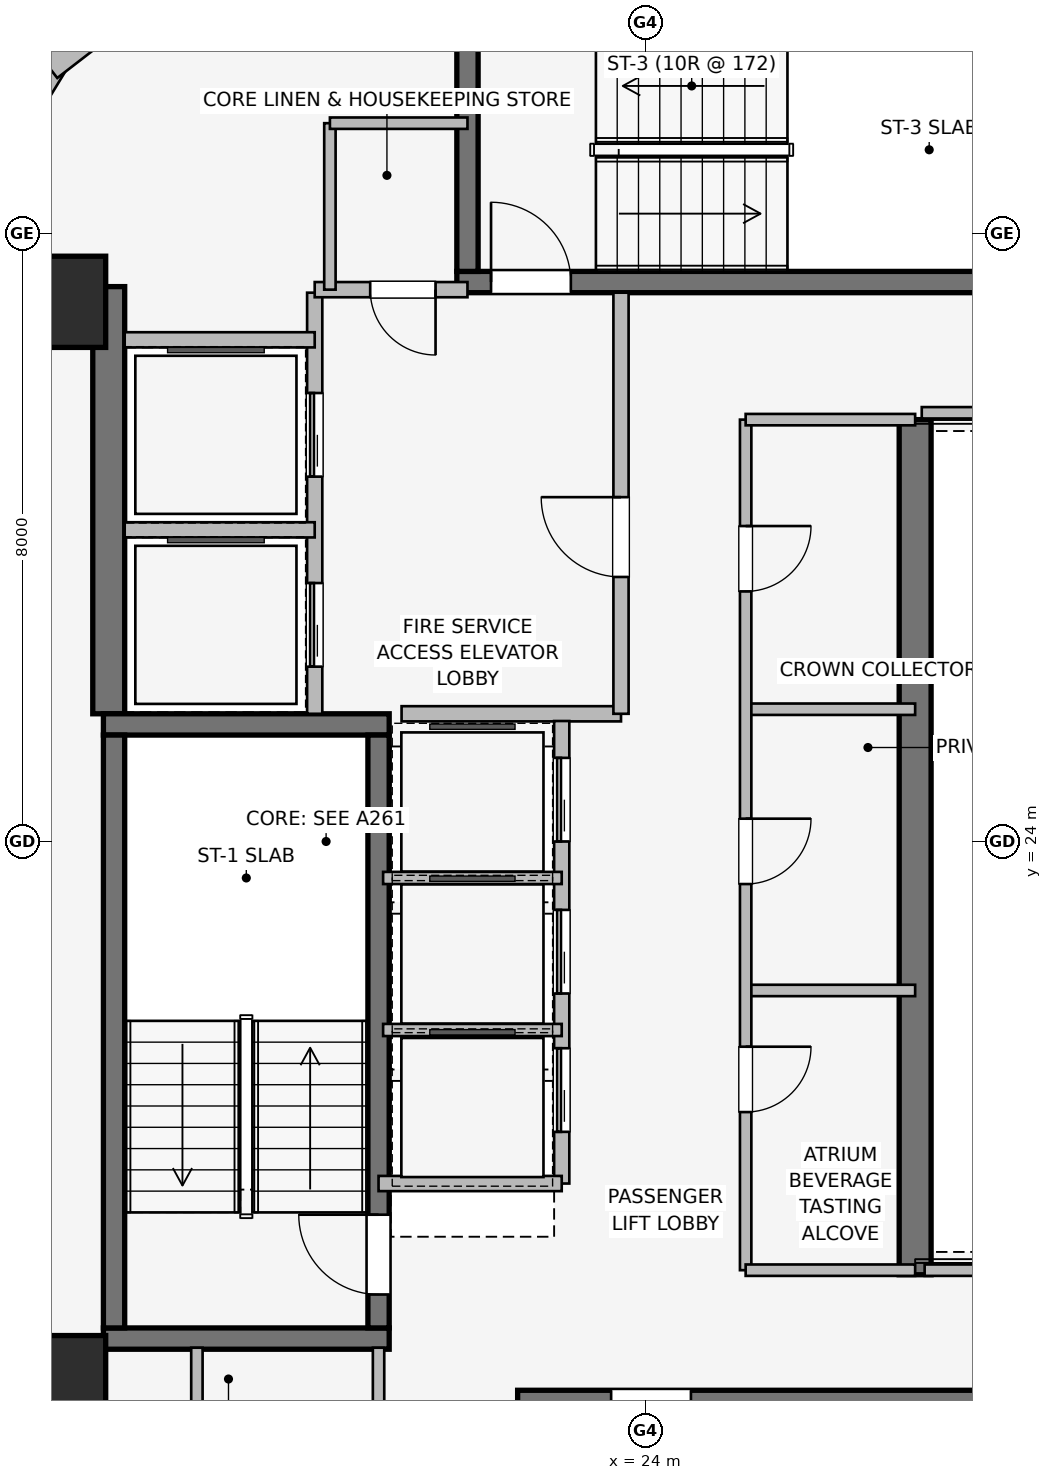
"""IFC4 building model, lengths in metres.
Left out: names, types, materials, properties, quantities, classifications, styles, units other than length and angle.
Written with IfcOpenShell. Run it as: python <this file> out.ifc"""

import sys

from ifc_helpers import new_model, si_unit, direction, frame, frame_2d, origin, origin_2d, place, context, subcontext, project, spatial, rectangle, extrude, element, fill, save


model = new_model("IFC4")
c1 = context("Model", 3, precision=1e-05, world=origin(), true_north=direction((0.0, 1.0)))
c2 = subcontext(c1, "Body", "Model", "MODEL_VIEW")
j1 = project(units=[si_unit("LENGTHUNIT", "METRE"), si_unit("PLANEANGLEUNIT", "RADIAN")], contexts=[c1])
p1 = place(None, origin())
s1 = spatial("IfcSite", under=j1, at=p1, CompositionType="ELEMENT")
p2 = place(p1, origin())
s2 = spatial("IfcBuilding", under=s1, at=p2, CompositionType="ELEMENT")
p3 = place(p2, frame((0.0, 0.0, 217.15)))
s3 = spatial("IfcBuildingStorey", under=s2, at=p3, CompositionType="ELEMENT", Elevation=217.15)
p4 = place(p3, frame((16.94, 25.68, 0.0), z_axis=(0.0, 0.0, 1.0), x_axis=(0.0, 1.0, 0.0)))
e1 = element("IfcWall", 1, at=p4, inside=s3, PredefinedType="SHEAR", context=c2, shape_type="SweptSolid", body=[
    extrude(rectangle(XDim=5.62, YDim=0.42, at=frame_2d((2.81, 0.0))), origin(), (0.0, 0.0, 1.0), 3.45),
])
p5 = place(p3, frame((27.55, 29.55, 0.0), z_axis=(0.0, 0.0, 1.0), x_axis=(0.0, -1.0, 0.0)))
e2 = element("IfcWall", 2, at=p5, inside=s3, PredefinedType="SHEAR", context=c2, shape_type="SweptSolid", body=[
    extrude(rectangle(XDim=11.25, YDim=0.42, at=frame_2d((5.625, 0.0))), origin(), (0.0, 0.0, 1.0), 3.45),
])
for number, where, z_axis, x_axis in (
    (3, (16.87, 17.46, 0.0), (0.0, 0.0, 1.0), (1.0, 0.0, 0.0)),
    (4, (20.63, 25.54, 0.0), (0.0, 0.0, 1.0), (-1.0, 0.0, 0.0)),
):
    element("IfcWall", number, at=place(p3, frame(where, z_axis=z_axis, x_axis=x_axis)), inside=s3, PredefinedType="SHEAR", context=c2, shape_type="SweptSolid", body=[
        extrude(rectangle(XDim=3.76, YDim=0.28, at=frame_2d((1.88, 0.0))), origin(), (0.0, 0.0, 1.0), 3.45),
    ])
p6 = place(p3, frame((17.01, 25.4, 0.0), z_axis=(0.0, 0.0, 1.0), x_axis=(0.0, -1.0, 0.0)))
e5 = element("IfcWall", 5, at=p6, inside=s3, PredefinedType="SHEAR", context=c2, shape_type="SweptSolid", body=[
    extrude(rectangle(XDim=7.8, YDim=0.28, at=frame_2d((3.9, 0.0))), origin(), (0.0, 0.0, 1.0), 3.45),
])
p7 = place(p3, frame((20.49, 17.6, 0.0), z_axis=(0.0, 0.0, 1.0), x_axis=(0.0, 1.0, 0.0)))
e6 = element("IfcWall", 6, at=p7, inside=s3, PredefinedType="SHEAR", context=c2, shape_type="SweptSolid", body=[
    extrude(rectangle(XDim=7.8, YDim=0.28, at=frame_2d((3.9, 0.0))), origin(), (0.0, 0.0, 1.0), 3.45),
])
p8 = place(p7, frame((0.44, 0.0, 0.0)))
e7 = element("IfcOpeningElement", 7, at=p8, cuts=e6, PredefinedType="OPENING", context=c2, shape_type="SweptSolid", body=[
    extrude(rectangle(XDim=1.05, YDim=2.0, at=frame_2d((0.525, 1.0))), frame((0.0, 0.15, 0.0), z_axis=(0.0, -1.0, 0.0), x_axis=(1.0, 0.0, 0.0)), (0.0, 0.0, 1.0), 0.3),
])
p9 = place(p3, frame((30.68, 16.64, 0.0), z_axis=(0.0, 0.0, 1.0), x_axis=(-1.0, 0.0, 0.0)))
e8 = element("IfcWall", 8, at=p9, inside=s3, PredefinedType="SHEAR", context=c2, shape_type="SweptSolid", body=[
    extrude(rectangle(XDim=8.36, YDim=0.28, at=frame_2d((4.18, 0.0))), origin(), (0.0, 0.0, 1.0), 3.45),
])
p10 = place(p9, frame((6.08, 0.0, 0.0)))
e9 = element("IfcOpeningElement", 9, at=p10, cuts=e8, PredefinedType="OPENING", context=c2, shape_type="SweptSolid", body=[
    extrude(rectangle(XDim=1.05, YDim=2.0, at=frame_2d((0.525, 1.0))), frame((0.0, 0.15, 0.0), z_axis=(0.0, -1.0, 0.0), x_axis=(1.0, 0.0, 0.0)), (0.0, 0.0, 1.0), 0.3),
])
p11 = place(p3, frame((21.52, 31.36, 0.0), z_axis=(0.0, 0.0, 1.0), x_axis=(1.0, 0.0, 0.0)))
e10 = element("IfcWall", 10, at=p11, inside=s3, PredefinedType="SHEAR", context=c2, shape_type="SweptSolid", body=[
    extrude(rectangle(XDim=8.36, YDim=0.28, at=frame_2d((4.18, 0.0))), origin(), (0.0, 0.0, 1.0), 3.45),
])
p12 = place(p11, frame((0.45, 0.0, 0.0)))
e11 = element("IfcOpeningElement", 11, at=p12, cuts=e10, PredefinedType="OPENING", context=c2, shape_type="SweptSolid", body=[
    extrude(rectangle(XDim=1.05, YDim=2.0, at=frame_2d((0.525, 1.0))), frame((0.0, 0.15, 0.0), z_axis=(0.0, -1.0, 0.0), x_axis=(1.0, 0.0, 0.0)), (0.0, 0.0, 1.0), 0.3),
])
p13 = place(p3, frame((21.66, 34.7, 0.0), z_axis=(0.0, 0.0, 1.0), x_axis=(0.0, -1.0, 0.0)))
e12 = element("IfcWall", 12, at=p13, inside=s3, PredefinedType="SHEAR", context=c2, shape_type="SweptSolid", body=[
    extrude(rectangle(XDim=3.2, YDim=0.28, at=frame_2d((1.6, 0.0))), origin(), (0.0, 0.0, 1.0), 3.45),
])
for number, where, z_axis, x_axis in (
    (13, (16.3, 16.9, 0.0), (0.0, 0.0, 1.0), (1.0, 0.0, 0.0)),
    (14, (16.3, 31.1, 0.0), (0.0, 0.0, 1.0), (1.0, 0.0, 0.0)),
):
    element("IfcColumn", number, at=place(p3, frame(where, z_axis=z_axis, x_axis=x_axis)), inside=s3, PredefinedType="COLUMN", context=c2, shape_type="SweptSolid", body=[
        extrude(rectangle(XDim=1.2, YDim=1.2, at=origin_2d()), origin(), (0.0, 0.0, 1.0), 3.45),
    ])
p14 = place(p3, frame((15.415, 32.882, 0.0), z_axis=(0.0, 0.0, 1.0), x_axis=(0.520325409202, 0.853968072318, 0.0)))
e15 = element("IfcWall", 15, at=p14, inside=s3, PredefinedType="STANDARD", context=c2, shape_type="SweptSolid", body=[
    extrude(rectangle(XDim=1.678, YDim=0.33, at=frame_2d((0.839, 0.0))), origin(), (0.0, 0.0, 1.0), 3.03),
])
p15 = place(p3, frame((16.162, 34.175, 0.0), z_axis=(0.0, 0.0, 1.0), x_axis=(0.791409877269, 0.611285862884, 0.0)))
e16 = element("IfcWall", 16, at=p15, inside=s3, PredefinedType="STANDARD", context=c2, shape_type="SweptSolid", body=[
    extrude(rectangle(XDim=1.677, YDim=0.33, at=frame_2d((0.838, 0.0))), origin(), (0.0, 0.0, 1.0), 3.03),
])
p16 = place(p3, frame((19.65, 25.68, 0.0), z_axis=(0.0, 0.0, 1.0), x_axis=(0.0, 1.0, 0.0)))
e17 = element("IfcWall", 17, at=p16, inside=s3, PredefinedType="PARTITIONING", context=c2, shape_type="SweptSolid", body=[
    extrude(rectangle(XDim=5.54, YDim=0.2, at=frame_2d((2.77, 0.0))), origin(), (0.0, 0.0, 1.0), 3.03),
])
p17 = place(p16, frame((0.62, 0.0, 0.0)))
e18 = element("IfcOpeningElement", 18, at=p17, cuts=e17, PredefinedType="OPENING", context=c2, shape_type="SweptSolid", body=[
    extrude(rectangle(XDim=1.1, YDim=2.2, at=frame_2d((0.55, 1.1))), frame((0.0, 0.11, 0.0), z_axis=(0.0, -1.0, 0.0), x_axis=(1.0, 0.0, 0.0)), (0.0, 0.0, 1.0), 0.22),
])
p18 = place(p16, frame((3.12, 0.0, 0.0)))
e19 = element("IfcOpeningElement", 19, at=p18, cuts=e17, PredefinedType="OPENING", context=c2, shape_type="SweptSolid", body=[
    extrude(rectangle(XDim=1.1, YDim=2.2, at=frame_2d((0.55, 1.1))), frame((0.0, 0.11, 0.0), z_axis=(0.0, -1.0, 0.0), x_axis=(1.0, 0.0, 0.0)), (0.0, 0.0, 1.0), 0.22),
])
p19 = place(p3, frame((20.793, 25.68, 0.0), z_axis=(0.0, 0.0, 1.0), x_axis=(1.0, 0.0, 0.0)))
e20 = element("IfcWall", 20, at=p19, inside=s3, PredefinedType="PARTITIONING", context=c2, shape_type="SweptSolid", body=[
    extrude(rectangle(XDim=2.887, YDim=0.2, at=frame_2d((1.443, 0.0))), origin(), (0.0, 0.0, 1.0), 3.03),
])
p20 = place(p3, frame((23.68, 25.68, 0.0), z_axis=(0.0, 0.0, 1.0), x_axis=(0.0, 1.0, 0.0)))
e21 = element("IfcWall", 21, at=p20, inside=s3, PredefinedType="PARTITIONING", context=c2, shape_type="SweptSolid", body=[
    extrude(rectangle(XDim=5.54, YDim=0.2, at=frame_2d((2.77, 0.0))), origin(), (0.0, 0.0, 1.0), 3.03),
])
p21 = place(p20, frame((1.8, 0.0, 0.0)))
e22 = element("IfcOpeningElement", 22, at=p21, cuts=e21, PredefinedType="OPENING", context=c2, shape_type="SweptSolid", body=[
    extrude(rectangle(XDim=1.05, YDim=2.0, at=frame_2d((0.525, 1.0))), frame((0.0, 0.11, 0.0), z_axis=(0.0, -1.0, 0.0), x_axis=(1.0, 0.0, 0.0)), (0.0, 0.0, 1.0), 0.22),
])
p22 = place(p3, frame((21.66, 31.26, 0.0), z_axis=(0.0, 0.0, 1.0), x_axis=(-1.0, 0.0, 0.0)))
e23 = element("IfcWall", 23, at=p22, inside=s3, PredefinedType="PARTITIONING", context=c2, shape_type="SweptSolid", body=[
    extrude(rectangle(XDim=2.01, YDim=0.2, at=frame_2d((1.005, 0.0))), origin(), (0.0, 0.0, 1.0), 3.03),
])
p23 = place(p22, frame((0.42, 0.0, 0.0)))
e24 = element("IfcOpeningElement", 24, at=p23, cuts=e23, PredefinedType="OPENING", context=c2, shape_type="SweptSolid", body=[
    extrude(rectangle(XDim=0.86, YDim=2.0, at=frame_2d((0.43, 1.0))), frame((0.0, 0.11, 0.0), z_axis=(0.0, -1.0, 0.0), x_axis=(1.0, 0.0, 0.0)), (0.0, 0.0, 1.0), 0.22),
])
p24 = place(p3, frame((17.15, 28.1, 0.0), z_axis=(0.0, 0.0, 1.0), x_axis=(1.0, 0.0, 0.0)))
e25 = element("IfcWall", 25, at=p24, inside=s3, PredefinedType="PARTITIONING", context=c2, shape_type="SweptSolid", body=[
    extrude(rectangle(XDim=2.5, YDim=0.2, at=frame_2d((1.25, 0.0))), origin(), (0.0, 0.0, 1.0), 3.03),
])
p25 = place(p3, frame((19.65, 30.6, 0.0), z_axis=(0.0, 0.0, 1.0), x_axis=(-1.0, 0.0, 0.0)))
e26 = element("IfcWall", 26, at=p25, inside=s3, PredefinedType="PARTITIONING", context=c2, shape_type="SweptSolid", body=[
    extrude(rectangle(XDim=2.5, YDim=0.2, at=frame_2d((1.25, 0.0))), origin(), (0.0, 0.0, 1.0), 1.93),
])
p26 = place(p3, frame((22.9, 19.5, 0.0), z_axis=(0.0, 0.0, 1.0), x_axis=(0.0, 1.0, 0.0)))
e27 = element("IfcWall", 27, at=p26, inside=s3, PredefinedType="PARTITIONING", context=c2, shape_type="SweptSolid", body=[
    extrude(rectangle(XDim=6.085, YDim=0.2, at=frame_2d((3.042, 0.0))), origin(), (0.0, 0.0, 1.0), 3.03),
])
p27 = place(p26, frame((0.68, 0.0, 0.0)))
e28 = element("IfcOpeningElement", 28, at=p27, cuts=e27, PredefinedType="OPENING", context=c2, shape_type="SweptSolid", body=[
    extrude(rectangle(XDim=1.1, YDim=2.2, at=frame_2d((0.55, 1.1))), frame((0.0, 0.11, 0.0), z_axis=(0.0, -1.0, 0.0), x_axis=(1.0, 0.0, 0.0)), (0.0, 0.0, 1.0), 0.22),
])
p28 = place(p26, frame((2.5, 0.0, 0.0)))
e29 = element("IfcOpeningElement", 29, at=p28, cuts=e27, PredefinedType="OPENING", context=c2, shape_type="SweptSolid", body=[
    extrude(rectangle(XDim=1.1, YDim=2.2, at=frame_2d((0.55, 1.1))), frame((0.0, 0.11, 0.0), z_axis=(0.0, -1.0, 0.0), x_axis=(1.0, 0.0, 0.0)), (0.0, 0.0, 1.0), 0.22),
])
p29 = place(p26, frame((4.5, 0.0, 0.0)))
e30 = element("IfcOpeningElement", 30, at=p29, cuts=e27, PredefinedType="OPENING", context=c2, shape_type="SweptSolid", body=[
    extrude(rectangle(XDim=1.1, YDim=2.2, at=frame_2d((0.55, 1.1))), frame((0.0, 0.11, 0.0), z_axis=(0.0, -1.0, 0.0), x_axis=(1.0, 0.0, 0.0)), (0.0, 0.0, 1.0), 0.22),
])
p30 = place(p3, frame((20.49, 19.5, 0.0), z_axis=(0.0, 0.0, 1.0), x_axis=(1.0, 0.0, 0.0)))
e31 = element("IfcWall", 31, at=p30, inside=s3, PredefinedType="PARTITIONING", context=c2, shape_type="SweptSolid", body=[
    extrude(rectangle(XDim=2.41, YDim=0.2, at=frame_2d((1.205, 0.0))), origin(), (0.0, 0.0, 1.0), 1.93),
])
for number, where, z_axis, x_axis in (
    (32, (20.55, 21.52, 0.0), (0.0, 0.0, 1.0), (1.0, 0.0, 0.0)),
    (33, (20.55, 23.52, 0.0), (0.0, 0.0, 1.0), (1.0, 0.0, 0.0)),
):
    element("IfcWall", number, at=place(p3, frame(where, z_axis=z_axis, x_axis=x_axis)), inside=s3, PredefinedType="PARTITIONING", context=c2, shape_type="SweptSolid", body=[
        extrude(rectangle(XDim=2.35, YDim=0.16, at=frame_2d((1.175, 0.0))), origin(), (0.0, 0.0, 1.0), 3.03),
    ])
for number, where, z_axis, x_axis in (
    (34, (25.32, 22.04, 0.0), (0.0, 0.0, 1.0), (1.0, 0.0, 0.0)),
    (35, (25.32, 25.74, 0.0), (0.0, 0.0, 1.0), (1.0, 0.0, 0.0)),
):
    element("IfcWall", number, at=place(p3, frame(where, z_axis=z_axis, x_axis=x_axis)), inside=s3, PredefinedType="PARTITIONING", context=c2, shape_type="SweptSolid", body=[
        extrude(rectangle(XDim=2.23, YDim=0.15, at=frame_2d((1.115, 0.0))), origin(), (0.0, 0.0, 1.0), 3.03),
    ])
p31 = place(p3, frame((25.32, 29.55, 0.0), z_axis=(0.0, 0.0, 1.0), x_axis=(0.0, -1.0, 0.0)))
e36 = element("IfcWall", 36, at=p31, inside=s3, PredefinedType="PARTITIONING", context=c2, shape_type="SweptSolid", body=[
    extrude(rectangle(XDim=11.19, YDim=0.15, at=frame_2d((5.595, 0.0))), origin(), (0.0, 0.0, 1.0), 3.03),
])
p32 = place(p31, frame((1.4, 0.0, 0.0)))
e37 = element("IfcOpeningElement", 37, at=p32, cuts=e36, PredefinedType="OPENING", context=c2, shape_type="SweptSolid", body=[
    extrude(rectangle(XDim=0.86, YDim=2.0, at=frame_2d((0.43, 1.0))), frame((0.0, 0.085, 0.0), z_axis=(0.0, -1.0, 0.0), x_axis=(1.0, 0.0, 0.0)), (0.0, 0.0, 1.0), 0.17),
])
p33 = place(p31, frame((5.25, 0.0, 0.0)))
e38 = element("IfcOpeningElement", 38, at=p33, cuts=e36, PredefinedType="OPENING", context=c2, shape_type="SweptSolid", body=[
    extrude(rectangle(XDim=0.86, YDim=2.0, at=frame_2d((0.43, 1.0))), frame((0.0, 0.085, 0.0), z_axis=(0.0, -1.0, 0.0), x_axis=(1.0, 0.0, 0.0)), (0.0, 0.0, 1.0), 0.17),
])
p34 = place(p31, frame((8.25, 0.0, 0.0)))
e39 = element("IfcOpeningElement", 39, at=p34, cuts=e36, PredefinedType="OPENING", context=c2, shape_type="SweptSolid", body=[
    extrude(rectangle(XDim=0.86, YDim=2.0, at=frame_2d((0.43, 1.0))), frame((0.0, 0.085, 0.0), z_axis=(0.0, -1.0, 0.0), x_axis=(1.0, 0.0, 0.0)), (0.0, 0.0, 1.0), 0.17),
])
p35 = place(p3, frame((25.32, 18.36, 0.0), z_axis=(0.0, 0.0, 1.0), x_axis=(1.0, 0.0, 0.0)))
e40 = element("IfcWall", 40, at=p35, inside=s3, PredefinedType="PARTITIONING", context=c2, shape_type="SweptSolid", body=[
    extrude(rectangle(XDim=2.23, YDim=0.15, at=frame_2d((1.115, 0.0))), origin(), (0.0, 0.0, 1.0), 3.03),
])
p36 = place(p3, frame((27.55, 29.55, 0.0), z_axis=(0.0, 0.0, 1.0), x_axis=(-1.0, 0.0, 0.0)))
e41 = element("IfcWall", 41, at=p36, inside=s3, PredefinedType="PARTITIONING", context=c2, shape_type="SweptSolid", body=[
    extrude(rectangle(XDim=2.23, YDim=0.15, at=frame_2d((1.115, 0.0))), origin(), (0.0, 0.0, 1.0), 1.93),
])
p37 = place(p3, frame((18.1, 17.34, 0.0), z_axis=(0.0, 0.0, 1.0), x_axis=(0.0, -1.0, 0.0)))
e42 = element("IfcWall", 42, at=p37, inside=s3, PredefinedType="PARTITIONING", context=c2, shape_type="SweptSolid", body=[
    extrude(rectangle(XDim=2.52, YDim=0.15, at=frame_2d((1.26, 0.0))), origin(), (0.0, 0.0, 1.0), 3.03),
])
p38 = place(p3, frame((20.49, 14.82, 0.0), z_axis=(0.0, 0.0, 1.0), x_axis=(0.0, 1.0, 0.0)))
e43 = element("IfcWall", 43, at=p38, inside=s3, PredefinedType="PARTITIONING", context=c2, shape_type="SweptSolid", body=[
    extrude(rectangle(XDim=2.52, YDim=0.15, at=frame_2d((1.26, 0.0))), origin(), (0.0, 0.0, 1.0), 3.03),
])
p39 = place(p38, frame((0.72, 0.0, 0.0)))
e44 = element("IfcOpeningElement", 44, at=p39, cuts=e43, PredefinedType="OPENING", context=c2, shape_type="SweptSolid", body=[
    extrude(rectangle(XDim=0.86, YDim=2.0, at=frame_2d((0.43, 1.0))), frame((0.0, 0.085, 0.0), z_axis=(0.0, -1.0, 0.0), x_axis=(1.0, 0.0, 0.0)), (0.0, 0.0, 1.0), 0.17),
])
p40 = place(p3, frame((19.85, 33.45, 0.0), z_axis=(0.0, 0.0, 1.0), x_axis=(0.0, -1.0, 0.0)))
e45 = element("IfcWall", 45, at=p40, inside=s3, PredefinedType="PARTITIONING", context=c2, shape_type="SweptSolid", body=[
    extrude(rectangle(XDim=2.19, YDim=0.15, at=frame_2d((1.095, 0.0))), origin(), (0.0, 0.0, 1.0), 3.03),
])
p41 = place(p3, frame((21.66, 33.45, 0.0), z_axis=(0.0, 0.0, 1.0), x_axis=(-1.0, 0.0, 0.0)))
e46 = element("IfcWall", 46, at=p41, inside=s3, PredefinedType="PARTITIONING", context=c2, shape_type="SweptSolid", body=[
    extrude(rectangle(XDim=1.81, YDim=0.15, at=frame_2d((0.905, 0.0))), origin(), (0.0, 0.0, 1.0), 3.03),
])
p42 = place(p3, frame((27.675, 18.36, 0.0), z_axis=(0.0, 0.0, 1.0), x_axis=(1.0, 0.0, 0.0)))
e47 = element("IfcWall", 47, at=p42, inside=s3, PredefinedType="PARTITIONING", context=c2, shape_type="SweptSolid", body=[
    extrude(rectangle(XDim=12.165, YDim=0.15, at=frame_2d((6.083, 0.0))), origin(), (0.0, 0.0, 1.0), 2.022),
])
p43 = place(p3, frame((39.84, 29.64, 0.0), z_axis=(0.0, 0.0, 1.0), x_axis=(-1.0, 0.0, 0.0)))
e48 = element("IfcWall", 48, at=p43, inside=s3, PredefinedType="PARTITIONING", context=c2, shape_type="SweptSolid", body=[
    extrude(rectangle(XDim=12.203, YDim=0.15, at=frame_2d((6.102, 0.0))), origin(), (0.0, 0.0, 1.0), 2.022),
])
p44 = place(p8, origin())
e49 = element("IfcDoor", 49, at=p44, inside=s3, OperationType="SINGLE_SWING_RIGHT", PredefinedType="DOOR", context=c2, shape_type="SweptSolid", body=[
    extrude(rectangle(XDim=1.05, YDim=2.0, at=frame_2d((0.525, 1.0))), frame((0.0, 0.025, 0.0), z_axis=(0.0, -1.0, 0.0), x_axis=(1.0, 0.0, 0.0)), (0.0, 0.0, 1.0), 0.05),
])
fill(e7, e49)
p45 = place(p10, origin())
e50 = element("IfcDoor", 50, at=p45, inside=s3, OperationType="SINGLE_SWING_RIGHT", PredefinedType="DOOR", context=c2, shape_type="SweptSolid", body=[
    extrude(rectangle(XDim=1.05, YDim=2.0, at=frame_2d((0.525, 1.0))), frame((0.0, 0.025, 0.0), z_axis=(0.0, -1.0, 0.0), x_axis=(1.0, 0.0, 0.0)), (0.0, 0.0, 1.0), 0.05),
])
fill(e9, e50)
p46 = place(p12, origin())
e51 = element("IfcDoor", 51, at=p46, inside=s3, OperationType="SINGLE_SWING_LEFT", PredefinedType="DOOR", context=c2, shape_type="SweptSolid", body=[
    extrude(rectangle(XDim=1.05, YDim=2.0, at=frame_2d((0.525, 1.0))), frame((0.0, 0.025, 0.0), z_axis=(0.0, -1.0, 0.0), x_axis=(1.0, 0.0, 0.0)), (0.0, 0.0, 1.0), 0.05),
])
fill(e11, e51)
p47 = place(p17, origin())
e52 = element("IfcDoor", 52, at=p47, inside=s3, OperationType="SLIDING_TO_LEFT", PredefinedType="DOOR", context=c2, shape_type="SweptSolid", body=[
    extrude(rectangle(XDim=1.1, YDim=2.2, at=frame_2d((0.55, 1.1))), frame((0.0, 0.025, 0.0), z_axis=(0.0, -1.0, 0.0), x_axis=(1.0, 0.0, 0.0)), (0.0, 0.0, 1.0), 0.05),
])
fill(e18, e52)
p48 = place(p18, origin())
e53 = element("IfcDoor", 53, at=p48, inside=s3, OperationType="SLIDING_TO_LEFT", PredefinedType="DOOR", context=c2, shape_type="SweptSolid", body=[
    extrude(rectangle(XDim=1.1, YDim=2.2, at=frame_2d((0.55, 1.1))), frame((0.0, 0.025, 0.0), z_axis=(0.0, -1.0, 0.0), x_axis=(1.0, 0.0, 0.0)), (0.0, 0.0, 1.0), 0.05),
])
fill(e19, e53)
p49 = place(p21, origin())
e54 = element("IfcDoor", 54, at=p49, inside=s3, OperationType="SINGLE_SWING_RIGHT", PredefinedType="DOOR", context=c2, shape_type="SweptSolid", body=[
    extrude(rectangle(XDim=1.05, YDim=2.0, at=frame_2d((0.525, 1.0))), frame((0.0, 0.025, 0.0), z_axis=(0.0, -1.0, 0.0), x_axis=(1.0, 0.0, 0.0)), (0.0, 0.0, 1.0), 0.05),
])
fill(e22, e54)
p50 = place(p23, origin())
e55 = element("IfcDoor", 55, at=p50, inside=s3, OperationType="SINGLE_SWING_LEFT", PredefinedType="DOOR", context=c2, shape_type="SweptSolid", body=[
    extrude(rectangle(XDim=0.86, YDim=2.0, at=frame_2d((0.43, 1.0))), frame((0.0, 0.025, 0.0), z_axis=(0.0, -1.0, 0.0), x_axis=(1.0, 0.0, 0.0)), (0.0, 0.0, 1.0), 0.05),
])
fill(e24, e55)
p51 = place(p27, origin())
e56 = element("IfcDoor", 56, at=p51, inside=s3, OperationType="SLIDING_TO_LEFT", PredefinedType="DOOR", context=c2, shape_type="SweptSolid", body=[
    extrude(rectangle(XDim=1.1, YDim=2.2, at=frame_2d((0.55, 1.1))), frame((0.0, 0.025, 0.0), z_axis=(0.0, -1.0, 0.0), x_axis=(1.0, 0.0, 0.0)), (0.0, 0.0, 1.0), 0.05),
])
fill(e28, e56)
p52 = place(p28, origin())
e57 = element("IfcDoor", 57, at=p52, inside=s3, OperationType="SLIDING_TO_LEFT", PredefinedType="DOOR", context=c2, shape_type="SweptSolid", body=[
    extrude(rectangle(XDim=1.1, YDim=2.2, at=frame_2d((0.55, 1.1))), frame((0.0, 0.025, 0.0), z_axis=(0.0, -1.0, 0.0), x_axis=(1.0, 0.0, 0.0)), (0.0, 0.0, 1.0), 0.05),
])
fill(e29, e57)
p53 = place(p29, origin())
e58 = element("IfcDoor", 58, at=p53, inside=s3, OperationType="SLIDING_TO_LEFT", PredefinedType="DOOR", context=c2, shape_type="SweptSolid", body=[
    extrude(rectangle(XDim=1.1, YDim=2.2, at=frame_2d((0.55, 1.1))), frame((0.0, 0.025, 0.0), z_axis=(0.0, -1.0, 0.0), x_axis=(1.0, 0.0, 0.0)), (0.0, 0.0, 1.0), 0.05),
])
fill(e30, e58)
p54 = place(p32, origin())
e59 = element("IfcDoor", 59, at=p54, inside=s3, OperationType="SINGLE_SWING_LEFT", PredefinedType="DOOR", context=c2, shape_type="SweptSolid", body=[
    extrude(rectangle(XDim=0.86, YDim=2.0, at=frame_2d((0.43, 1.0))), frame((0.0, 0.025, 0.0), z_axis=(0.0, -1.0, 0.0), x_axis=(1.0, 0.0, 0.0)), (0.0, 0.0, 1.0), 0.05),
])
fill(e37, e59)
p55 = place(p33, origin())
e60 = element("IfcDoor", 60, at=p55, inside=s3, OperationType="SINGLE_SWING_LEFT", PredefinedType="DOOR", context=c2, shape_type="SweptSolid", body=[
    extrude(rectangle(XDim=0.86, YDim=2.0, at=frame_2d((0.43, 1.0))), frame((0.0, 0.025, 0.0), z_axis=(0.0, -1.0, 0.0), x_axis=(1.0, 0.0, 0.0)), (0.0, 0.0, 1.0), 0.05),
])
fill(e38, e60)
p56 = place(p34, origin())
e61 = element("IfcDoor", 61, at=p56, inside=s3, OperationType="SINGLE_SWING_LEFT", PredefinedType="DOOR", context=c2, shape_type="SweptSolid", body=[
    extrude(rectangle(XDim=0.86, YDim=2.0, at=frame_2d((0.43, 1.0))), frame((0.0, 0.025, 0.0), z_axis=(0.0, -1.0, 0.0), x_axis=(1.0, 0.0, 0.0)), (0.0, 0.0, 1.0), 0.05),
])
fill(e39, e61)
save(model, sys.argv[1])
